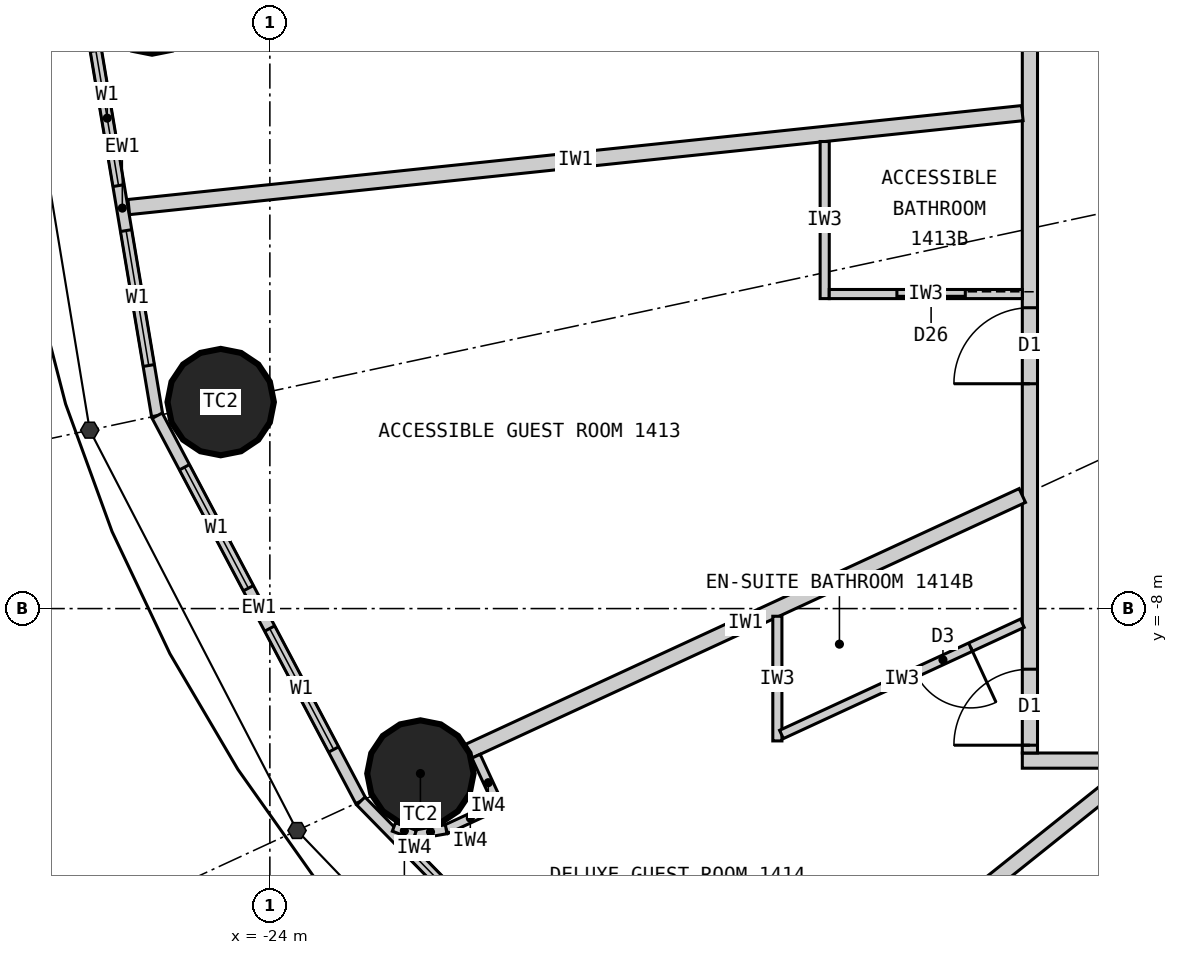
"""IFC4 building model, lengths in metres.
Left out: names, types, materials, properties, quantities, classifications, styles, units other than length and angle.
Written with IfcOpenShell. Run it as: python <this file> out.ifc"""

import sys

from ifc_helpers import new_model, si_unit, direction, frame, frame_2d, origin, origin_2d, place, context, subcontext, project, spatial, rectangle, circle, extrude, element, fill, save


model = new_model("IFC4")
c1 = context("Model", 3, precision=1e-05, world=origin(), true_north=direction((0.0, 1.0)))
c2 = subcontext(c1, "Body", "Model", "MODEL_VIEW")
j1 = project(units=[si_unit("LENGTHUNIT", "METRE"), si_unit("PLANEANGLEUNIT", "RADIAN")], contexts=[c1])
p1 = place(None, origin())
s1 = spatial("IfcSite", under=j1, at=p1, CompositionType="ELEMENT")
p2 = place(p1, origin())
s2 = spatial("IfcBuilding", under=s1, at=p2, CompositionType="ELEMENT")
p3 = place(p2, frame((0.0, 0.0, 60.6)))
s3 = spatial("IfcBuildingStorey", under=s2, at=p3, CompositionType="ELEMENT", Elevation=60.6)
for number, where, z_axis, x_axis in (
    (1, (-25.55, 0.0, 0.0), (0.0, 0.0, 1.0), (1.0, 0.0, 0.0)),
    (2, (-24.647, -5.283, 0.0), (0.0, 0.0, 1.0), (1.0, 0.0, 0.0)),
    (3, (-22.019, -10.17, 0.0), (0.0, 0.0, 1.0), (1.0, 0.0, 0.0)),
):
    element("IfcColumn", number, at=place(p3, frame(where, z_axis=z_axis, x_axis=x_axis)), inside=s3, PredefinedType="COLUMN", context=c2, shape_type="SweptSolid", body=[
        extrude(circle(Radius=0.7, at=origin_2d()), origin(), (0.0, 0.0, 1.0), 3.3),
    ])
p4 = place(p3, frame((-26.4, 0.0, 0.0), z_axis=(0.0, 0.0, 1.0), x_axis=(0.165642551694, -0.986185857264, 0.0)))
e4 = element("IfcWall", 4, at=p4, inside=s3, PredefinedType="ELEMENTEDWALL", context=c2, shape_type="SweptSolid", body=[
    extrude(rectangle(XDim=5.539, YDim=0.15, at=frame_2d((2.77, 0.0))), origin(), (0.0, 0.0, 1.0), 3.12),
])
p5 = place(p4, frame((0.669, 0.0, 0.9)))
e5 = element("IfcOpeningElement", 5, at=p5, cuts=e4, PredefinedType="OPENING", context=c2, shape_type="SweptSolid", body=[
    extrude(rectangle(XDim=1.8, YDim=1.9, at=frame_2d((0.9, 0.95))), frame((0.0, 0.085, 0.0), z_axis=(0.0, -1.0, 0.0), x_axis=(1.0, 0.0, 0.0)), (0.0, 0.0, 1.0), 0.17),
])
p6 = place(p4, frame((3.07, 0.0, 0.9)))
e6 = element("IfcOpeningElement", 6, at=p6, cuts=e4, PredefinedType="OPENING", context=c2, shape_type="SweptSolid", body=[
    extrude(rectangle(XDim=1.8, YDim=1.9, at=frame_2d((0.9, 0.95))), frame((0.0, 0.085, 0.0), z_axis=(0.0, -1.0, 0.0), x_axis=(1.0, 0.0, 0.0)), (0.0, 0.0, 1.0), 0.17),
])
p7 = place(p3, frame((-25.482, -5.462, 0.0), z_axis=(0.0, 0.0, 1.0), x_axis=(0.467296867008, -0.884100468321, 0.0)))
e7 = element("IfcWall", 7, at=p7, inside=s3, PredefinedType="ELEMENTEDWALL", context=c2, shape_type="SweptSolid", body=[
    extrude(rectangle(XDim=5.734, YDim=0.15, at=frame_2d((2.867, 0.0))), origin(), (0.0, 0.0, 1.0), 3.12),
])
p8 = place(p7, frame((0.767, 0.0, 0.9)))
e8 = element("IfcOpeningElement", 8, at=p8, cuts=e7, PredefinedType="OPENING", context=c2, shape_type="SweptSolid", body=[
    extrude(rectangle(XDim=1.8, YDim=1.9, at=frame_2d((0.9, 0.95))), frame((0.0, 0.085, 0.0), z_axis=(0.0, -1.0, 0.0), x_axis=(1.0, 0.0, 0.0)), (0.0, 0.0, 1.0), 0.17),
])
p9 = place(p7, frame((3.167, 0.0, 0.9)))
e9 = element("IfcOpeningElement", 9, at=p9, cuts=e7, PredefinedType="OPENING", context=c2, shape_type="SweptSolid", body=[
    extrude(rectangle(XDim=1.8, YDim=1.9, at=frame_2d((0.9, 0.95))), frame((0.0, 0.085, 0.0), z_axis=(0.0, -1.0, 0.0), x_axis=(1.0, 0.0, 0.0)), (0.0, 0.0, 1.0), 0.17),
])
p10 = place(p3, frame((-22.803, -10.532, 0.0), z_axis=(0.0, 0.0, 1.0), x_axis=(0.699602905915, -0.714531856557, 0.0)))
e10 = element("IfcWall", 10, at=p10, inside=s3, PredefinedType="ELEMENTEDWALL", context=c2, shape_type="SweptSolid", body=[
    extrude(rectangle(XDim=6.051, YDim=0.15, at=frame_2d((3.025, 0.0))), origin(), (0.0, 0.0, 1.0), 3.12),
])
p11 = place(p10, frame((0.926, 0.0, 0.9)))
e11 = element("IfcOpeningElement", 11, at=p11, cuts=e10, PredefinedType="OPENING", context=c2, shape_type="SweptSolid", body=[
    extrude(rectangle(XDim=1.8, YDim=1.9, at=frame_2d((0.9, 0.95))), frame((0.0, 0.085, 0.0), z_axis=(0.0, -1.0, 0.0), x_axis=(1.0, 0.0, 0.0)), (0.0, 0.0, 1.0), 0.17),
])
p12 = place(p10, frame((3.325, 0.0, 0.9)))
e12 = element("IfcOpeningElement", 12, at=p12, cuts=e10, PredefinedType="OPENING", context=c2, shape_type="SweptSolid", body=[
    extrude(rectangle(XDim=1.8, YDim=1.9, at=frame_2d((0.9, 0.95))), frame((0.0, 0.085, 0.0), z_axis=(0.0, -1.0, 0.0), x_axis=(1.0, 0.0, 0.0)), (0.0, 0.0, 1.0), 0.17),
])
p13 = place(p3, frame((14.1, -10.0, 0.0), z_axis=(0.0, 0.0, 1.0), x_axis=(-1.0, 0.0, 0.0)))
e13 = element("IfcWall", 13, at=p13, inside=s3, PredefinedType="PARTITIONING", context=c2, shape_type="SweptSolid", body=[
    extrude(rectangle(XDim=28.2, YDim=0.2, at=frame_2d((14.1, 0.0))), origin(), (0.0, 0.0, 1.0), 3.12),
])
p14 = place(p13, frame((23.865, 0.0, 0.0)))
e14 = element("IfcOpeningElement", 14, at=p14, cuts=e13, PredefinedType="OPENING", context=c2, shape_type="SweptSolid", body=[
    extrude(rectangle(XDim=1.0, YDim=2.2, at=frame_2d((0.5, 1.1))), frame((0.0, 0.11, 0.0), z_axis=(0.0, -1.0, 0.0), x_axis=(1.0, 0.0, 0.0)), (0.0, 0.0, 1.0), 0.22),
])
p15 = place(p13, frame((18.529, 0.0, 0.0)))
e15 = element("IfcOpeningElement", 15, at=p15, cuts=e13, PredefinedType="OPENING", context=c2, shape_type="SweptSolid", body=[
    extrude(rectangle(XDim=1.0, YDim=2.2, at=frame_2d((0.5, 1.1))), frame((0.0, 0.11, 0.0), z_axis=(0.0, -1.0, 0.0), x_axis=(1.0, 0.0, 0.0)), (0.0, 0.0, 1.0), 0.22),
])
p16 = place(p13, frame((14.623, 0.0, 0.0)))
e16 = element("IfcOpeningElement", 16, at=p16, cuts=e13, PredefinedType="OPENING", context=c2, shape_type="SweptSolid", body=[
    extrude(rectangle(XDim=1.0, YDim=2.2, at=frame_2d((0.5, 1.1))), frame((0.0, 0.11, 0.0), z_axis=(0.0, -1.0, 0.0), x_axis=(1.0, 0.0, 0.0)), (0.0, 0.0, 1.0), 0.22),
])
p17 = place(p13, frame((11.24, 0.0, 0.0)))
e17 = element("IfcOpeningElement", 17, at=p17, cuts=e13, PredefinedType="OPENING", context=c2, shape_type="SweptSolid", body=[
    extrude(rectangle(XDim=1.0, YDim=2.2, at=frame_2d((0.5, 1.1))), frame((0.0, 0.11, 0.0), z_axis=(0.0, -1.0, 0.0), x_axis=(1.0, 0.0, 0.0)), (0.0, 0.0, 1.0), 0.22),
])
p18 = place(p13, frame((8.671, 0.0, 0.0)))
e18 = element("IfcOpeningElement", 18, at=p18, cuts=e13, PredefinedType="OPENING", context=c2, shape_type="SweptSolid", body=[
    extrude(rectangle(XDim=1.0, YDim=2.2, at=frame_2d((0.5, 1.1))), frame((0.0, 0.11, 0.0), z_axis=(0.0, -1.0, 0.0), x_axis=(1.0, 0.0, 0.0)), (0.0, 0.0, 1.0), 0.22),
])
p19 = place(p13, frame((2.801, 0.0, 0.0)))
e19 = element("IfcOpeningElement", 19, at=p19, cuts=e13, PredefinedType="OPENING", context=c2, shape_type="SweptSolid", body=[
    extrude(rectangle(XDim=1.0, YDim=2.2, at=frame_2d((0.5, 1.1))), frame((0.0, 0.11, 0.0), z_axis=(0.0, -1.0, 0.0), x_axis=(1.0, 0.0, 0.0)), (0.0, 0.0, 1.0), 0.22),
])
p20 = place(p3, frame((-14.0, 9.9, 0.0), z_axis=(0.0, 0.0, 1.0), x_axis=(0.0, -1.0, 0.0)))
e20 = element("IfcWall", 20, at=p20, inside=s3, PredefinedType="PARTITIONING", context=c2, shape_type="SweptSolid", body=[
    extrude(rectangle(XDim=19.8, YDim=0.2, at=frame_2d((9.9, 0.0))), origin(), (0.0, 0.0, 1.0), 3.12),
])
p21 = place(p20, frame((0.103, 0.0, 0.0)))
e21 = element("IfcOpeningElement", 21, at=p21, cuts=e20, PredefinedType="OPENING", context=c2, shape_type="SweptSolid", body=[
    extrude(rectangle(XDim=1.0, YDim=2.2, at=frame_2d((0.5, 1.1))), frame((0.0, 0.11, 0.0), z_axis=(0.0, -1.0, 0.0), x_axis=(1.0, 0.0, 0.0)), (0.0, 0.0, 1.0), 0.22),
])
p22 = place(p20, frame((5.248, 0.0, 0.0)))
e22 = element("IfcOpeningElement", 22, at=p22, cuts=e20, PredefinedType="OPENING", context=c2, shape_type="SweptSolid", body=[
    extrude(rectangle(XDim=1.0, YDim=2.2, at=frame_2d((0.5, 1.1))), frame((0.0, 0.11, 0.0), z_axis=(0.0, -1.0, 0.0), x_axis=(1.0, 0.0, 0.0)), (0.0, 0.0, 1.0), 0.22),
])
p23 = place(p20, frame((9.438, 0.0, 0.0)))
e23 = element("IfcOpeningElement", 23, at=p23, cuts=e20, PredefinedType="OPENING", context=c2, shape_type="SweptSolid", body=[
    extrude(rectangle(XDim=1.0, YDim=2.2, at=frame_2d((0.5, 1.1))), frame((0.0, 0.11, 0.0), z_axis=(0.0, -1.0, 0.0), x_axis=(1.0, 0.0, 0.0)), (0.0, 0.0, 1.0), 0.22),
])
p24 = place(p20, frame((13.942, 0.0, 0.0)))
e24 = element("IfcOpeningElement", 24, at=p24, cuts=e20, PredefinedType="OPENING", context=c2, shape_type="SweptSolid", body=[
    extrude(rectangle(XDim=1.0, YDim=2.2, at=frame_2d((0.5, 1.1))), frame((0.0, 0.11, 0.0), z_axis=(0.0, -1.0, 0.0), x_axis=(1.0, 0.0, 0.0)), (0.0, 0.0, 1.0), 0.22),
])
p25 = place(p20, frame((18.698, 0.0, 0.0)))
e25 = element("IfcOpeningElement", 25, at=p25, cuts=e20, PredefinedType="OPENING", context=c2, shape_type="SweptSolid", body=[
    extrude(rectangle(XDim=1.0, YDim=2.2, at=frame_2d((0.5, 1.1))), frame((0.0, 0.11, 0.0), z_axis=(0.0, -1.0, 0.0), x_axis=(1.0, 0.0, 0.0)), (0.0, 0.0, 1.0), 0.22),
])
p26 = place(p3, frame((-14.1, -1.482, 0.0), z_axis=(0.0, 0.0, 1.0), x_axis=(-0.994522076235, -0.104526742422, 0.0)))
e26 = element("IfcWall", 26, at=p26, inside=s3, PredefinedType="PARTITIONING", context=c2, shape_type="SweptSolid", body=[
    extrude(rectangle(XDim=11.821, YDim=0.2, at=frame_2d((5.91, 0.0))), origin(), (0.0, 0.0, 1.0), 2.32),
])
p27 = place(p3, frame((-14.1, -6.512, 0.0), z_axis=(0.0, 0.0, 1.0), x_axis=(-0.907832871056, -0.419332181247, 0.0)))
e27 = element("IfcWall", 27, at=p27, inside=s3, PredefinedType="PARTITIONING", context=c2, shape_type="SweptSolid", body=[
    extrude(rectangle(XDim=8.023, YDim=0.2, at=frame_2d((4.011, 0.0))), origin(), (0.0, 0.0, 1.0), 2.32),
])
p28 = place(p3, frame((-12.625, -10.1, 0.0), z_axis=(0.0, 0.0, 1.0), x_axis=(-0.780892451574, -0.624665493744, 0.0)))
e28 = element("IfcWall", 28, at=p28, inside=s3, PredefinedType="PARTITIONING", context=c2, shape_type="SweptSolid", body=[
    extrude(rectangle(XDim=6.045, YDim=0.2, at=frame_2d((3.022, 0.0))), origin(), (0.0, 0.0, 1.0), 2.32),
])
p29 = place(p3, frame((-16.7, -1.855, 0.0), z_axis=(0.0, 0.0, 1.0), x_axis=(0.0, -1.0, 0.0)))
e29 = element("IfcWall", 29, at=p29, inside=s3, PredefinedType="PARTITIONING", context=c2, shape_type="SweptSolid", body=[
    extrude(rectangle(XDim=2.067, YDim=0.12, at=frame_2d((1.033, 0.0))), origin(), (0.0, 0.0, 1.0), 3.12),
])
p30 = place(p3, frame((-14.1, -3.862, 0.0), z_axis=(0.0, 0.0, 1.0), x_axis=(-1.0, 0.0, 0.0)))
e30 = element("IfcWall", 30, at=p30, inside=s3, PredefinedType="PARTITIONING", context=c2, shape_type="SweptSolid", body=[
    extrude(rectangle(XDim=2.54, YDim=0.12, at=frame_2d((1.27, 0.0))), origin(), (0.0, 0.0, 1.0), 2.32),
])
p31 = place(p30, frame((0.75, 0.0, 0.0)))
e31 = element("IfcOpeningElement", 31, at=p31, cuts=e30, PredefinedType="OPENING", context=c2, shape_type="SweptSolid", body=[
    extrude(rectangle(XDim=0.9, YDim=2.1, at=frame_2d((0.45, 1.05))), frame((0.0, 0.07, 0.0), z_axis=(0.0, -1.0, 0.0), x_axis=(1.0, 0.0, 0.0)), (0.0, 0.0, 1.0), 0.14),
])
p32 = place(p3, frame((-17.323, -8.101, 0.0), z_axis=(0.0, 0.0, 1.0), x_axis=(0.0, -1.0, 0.0)))
e32 = element("IfcWall", 32, at=p32, inside=s3, PredefinedType="PARTITIONING", context=c2, shape_type="SweptSolid", body=[
    extrude(rectangle(XDim=1.64, YDim=0.12, at=frame_2d((0.82, 0.0))), origin(), (0.0, 0.0, 1.0), 3.12),
])
p33 = place(p3, frame((-14.1, -8.193, 0.0), z_axis=(0.0, 0.0, 1.0), x_axis=(-0.907836493557, -0.419324338628, 0.0)))
e33 = element("IfcWall", 33, at=p33, inside=s3, PredefinedType="PARTITIONING", context=c2, shape_type="SweptSolid", body=[
    extrude(rectangle(XDim=3.49, YDim=0.12, at=frame_2d((1.745, 0.0))), origin(), (0.0, 0.0, 1.0), 3.12),
])
p34 = place(p33, frame((0.75, 0.0, 0.0)))
e34 = element("IfcOpeningElement", 34, at=p34, cuts=e33, PredefinedType="OPENING", context=c2, shape_type="SweptSolid", body=[
    extrude(rectangle(XDim=0.8, YDim=2.1, at=frame_2d((0.4, 1.05))), frame((0.0, 0.07, 0.0), z_axis=(0.0, -1.0, 0.0), x_axis=(1.0, 0.0, 0.0)), (0.0, 0.0, 1.0), 0.14),
])
p35 = place(p3, frame((-21.287, -9.942, 0.0), z_axis=(0.0, 0.0, 1.0), x_axis=(0.419259891039, -0.907866258744, 0.0)))
e35 = element("IfcWall", 35, at=p35, inside=s3, PredefinedType="PARTITIONING", context=c2, shape_type="SweptSolid", body=[
    extrude(rectangle(XDim=0.768, YDim=0.12, at=frame_2d((0.384, 0.0))), origin(), (0.0, 0.0, 1.0), 3.12),
])
p36 = place(p3, frame((-21.045, -10.61, 0.0), z_axis=(0.0, 0.0, 1.0), x_axis=(-0.907877701396, -0.419235112208, 0.0)))
e36 = element("IfcWall", 36, at=p36, inside=s3, PredefinedType="PARTITIONING", context=c2, shape_type="SweptSolid", body=[
    extrude(rectangle(XDim=0.7, YDim=0.12, at=frame_2d((0.35, 0.0))), origin(), (0.0, 0.0, 1.0), 3.12),
])
p37 = place(p3, frame((-21.68, -10.903, 0.0), z_axis=(0.0, 0.0, 1.0), x_axis=(-0.985446622073, -0.169985161247, 0.0)))
e37 = element("IfcWall", 37, at=p37, inside=s3, PredefinedType="PARTITIONING", context=c2, shape_type="SweptSolid", body=[
    extrude(rectangle(XDim=0.418, YDim=0.12, at=frame_2d((0.209, 0.0))), origin(), (0.0, 0.0, 1.0), 3.12),
])
p38 = place(p3, frame((-22.092, -10.974, 0.0), z_axis=(0.0, 0.0, 1.0), x_axis=(-0.938428160676, 0.345474437912, 0.0)))
e38 = element("IfcWall", 38, at=p38, inside=s3, PredefinedType="PARTITIONING", context=c2, shape_type="SweptSolid", body=[
    extrude(rectangle(XDim=0.294, YDim=0.12, at=frame_2d((0.147, 0.0))), origin(), (0.0, 0.0, 1.0), 3.12),
])
p39 = place(p5, origin())
e39 = element("IfcWindow", 39, at=p39, inside=s3, PartitioningType="SINGLE_PANEL", PredefinedType="WINDOW", context=c2, shape_type="SweptSolid", body=[
    extrude(rectangle(XDim=1.8, YDim=1.9, at=frame_2d((0.9, 0.95))), frame((0.0, 0.03, 0.0), z_axis=(0.0, -1.0, 0.0), x_axis=(1.0, 0.0, 0.0)), (0.0, 0.0, 1.0), 0.06),
])
fill(e5, e39)
p40 = place(p6, origin())
e40 = element("IfcWindow", 40, at=p40, inside=s3, PartitioningType="SINGLE_PANEL", PredefinedType="WINDOW", context=c2, shape_type="SweptSolid", body=[
    extrude(rectangle(XDim=1.8, YDim=1.9, at=frame_2d((0.9, 0.95))), frame((0.0, 0.03, 0.0), z_axis=(0.0, -1.0, 0.0), x_axis=(1.0, 0.0, 0.0)), (0.0, 0.0, 1.0), 0.06),
])
fill(e6, e40)
p41 = place(p8, origin())
e41 = element("IfcWindow", 41, at=p41, inside=s3, PartitioningType="SINGLE_PANEL", PredefinedType="WINDOW", context=c2, shape_type="SweptSolid", body=[
    extrude(rectangle(XDim=1.8, YDim=1.9, at=frame_2d((0.9, 0.95))), frame((0.0, 0.03, 0.0), z_axis=(0.0, -1.0, 0.0), x_axis=(1.0, 0.0, 0.0)), (0.0, 0.0, 1.0), 0.06),
])
fill(e8, e41)
p42 = place(p9, origin())
e42 = element("IfcWindow", 42, at=p42, inside=s3, PartitioningType="SINGLE_PANEL", PredefinedType="WINDOW", context=c2, shape_type="SweptSolid", body=[
    extrude(rectangle(XDim=1.8, YDim=1.9, at=frame_2d((0.9, 0.95))), frame((0.0, 0.03, 0.0), z_axis=(0.0, -1.0, 0.0), x_axis=(1.0, 0.0, 0.0)), (0.0, 0.0, 1.0), 0.06),
])
fill(e9, e42)
p43 = place(p11, origin())
e43 = element("IfcWindow", 43, at=p43, inside=s3, PartitioningType="SINGLE_PANEL", PredefinedType="WINDOW", context=c2, shape_type="SweptSolid", body=[
    extrude(rectangle(XDim=1.8, YDim=1.9, at=frame_2d((0.9, 0.95))), frame((0.0, 0.03, 0.0), z_axis=(0.0, -1.0, 0.0), x_axis=(1.0, 0.0, 0.0)), (0.0, 0.0, 1.0), 0.06),
])
fill(e11, e43)
p44 = place(p31, origin())
e44 = element("IfcDoor", 44, at=p44, inside=s3, OperationType="SLIDING_TO_LEFT", PredefinedType="DOOR", context=c2, shape_type="SweptSolid", body=[
    extrude(rectangle(XDim=0.9, YDim=2.1, at=frame_2d((0.45, 1.05))), frame((0.0, 0.025, 0.0), z_axis=(0.0, -1.0, 0.0), x_axis=(1.0, 0.0, 0.0)), (0.0, 0.0, 1.0), 0.05),
])
fill(e31, e44)
p45 = place(p24, origin())
e45 = element("IfcDoor", 45, at=p45, inside=s3, OperationType="SINGLE_SWING_RIGHT", PredefinedType="DOOR", context=c2, shape_type="SweptSolid", body=[
    extrude(rectangle(XDim=1.0, YDim=2.2, at=frame_2d((0.5, 1.1))), frame((0.0, 0.025, 0.0), z_axis=(0.0, -1.0, 0.0), x_axis=(1.0, 0.0, 0.0)), (0.0, 0.0, 1.0), 0.05),
])
fill(e24, e45)
p46 = place(p34, origin())
e46 = element("IfcDoor", 46, at=p46, inside=s3, OperationType="SINGLE_SWING_LEFT", PredefinedType="DOOR", context=c2, shape_type="SweptSolid", body=[
    extrude(rectangle(XDim=0.8, YDim=2.1, at=frame_2d((0.4, 1.05))), frame((0.0, 0.025, 0.0), z_axis=(0.0, -1.0, 0.0), x_axis=(1.0, 0.0, 0.0)), (0.0, 0.0, 1.0), 0.05),
])
fill(e34, e46)
p47 = place(p25, origin())
e47 = element("IfcDoor", 47, at=p47, inside=s3, OperationType="SINGLE_SWING_RIGHT", PredefinedType="DOOR", context=c2, shape_type="SweptSolid", body=[
    extrude(rectangle(XDim=1.0, YDim=2.2, at=frame_2d((0.5, 1.1))), frame((0.0, 0.025, 0.0), z_axis=(0.0, -1.0, 0.0), x_axis=(1.0, 0.0, 0.0)), (0.0, 0.0, 1.0), 0.05),
])
fill(e25, e47)
save(model, sys.argv[1])
